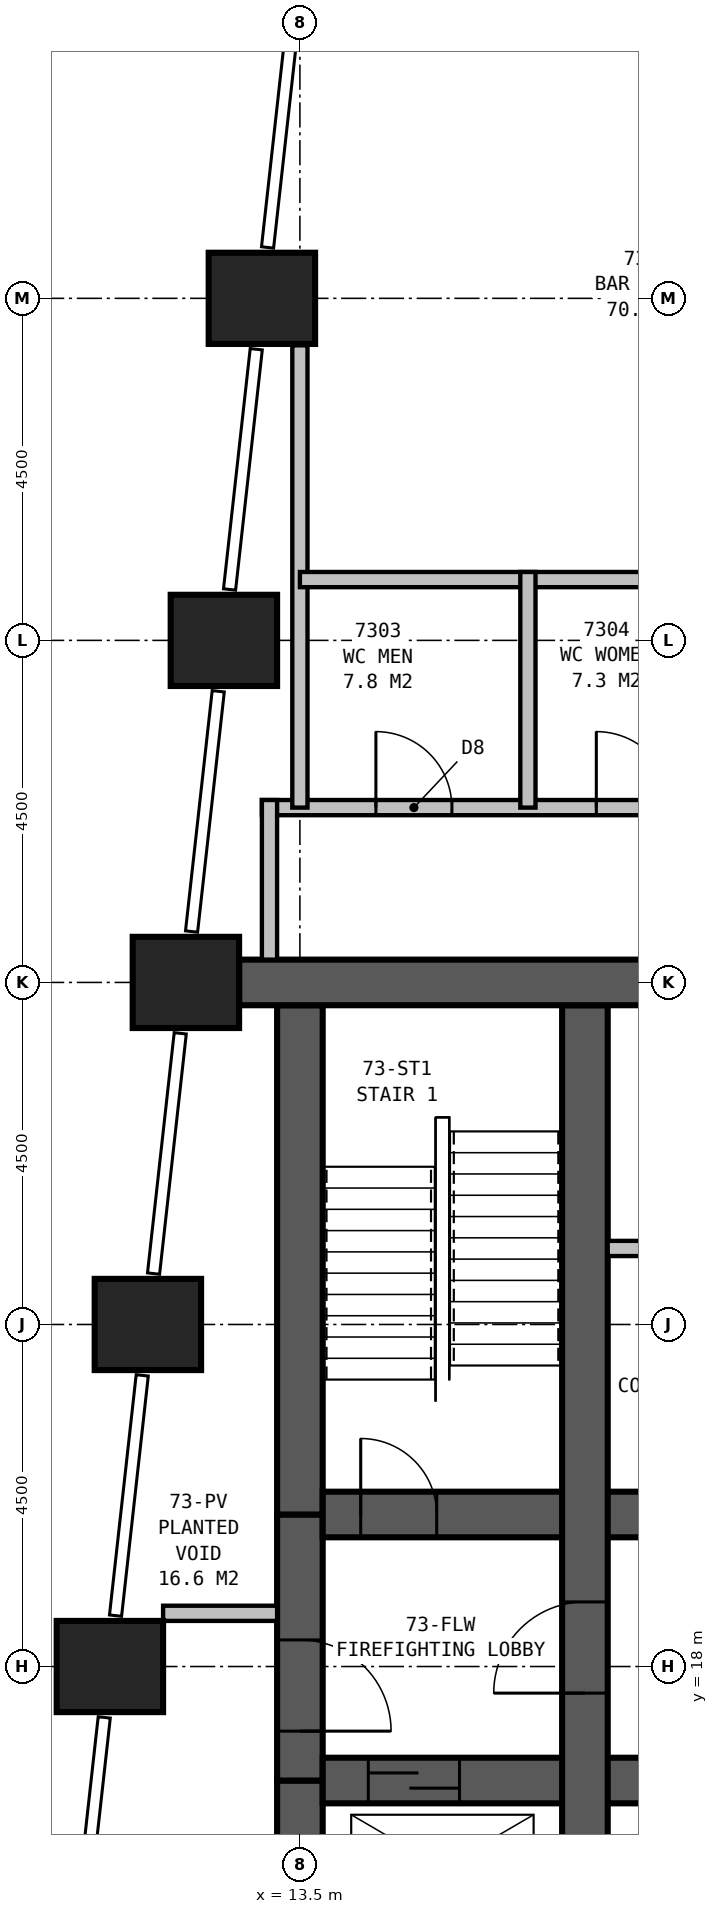
"""IFC4 building model, lengths in metres.
Left out: names, types, materials, properties, quantities, classifications, styles, units other than length and angle.
Written with IfcOpenShell. Run it as: python <this file> out.ifc"""

import sys

from ifc_helpers import new_model, si_unit, direction, frame, frame_2d, origin, origin_2d, place, context, subcontext, project, spatial, rectangle, extrude, element, fill, save


model = new_model("IFC4")
c1 = context("Model", 3, precision=1e-05, world=origin(), true_north=direction((0.0, 1.0)))
c2 = subcontext(c1, "Body", "Model", "MODEL_VIEW")
j1 = project(units=[si_unit("LENGTHUNIT", "METRE"), si_unit("PLANEANGLEUNIT", "RADIAN")], contexts=[c1])
p1 = place(None, origin())
s1 = spatial("IfcSite", under=j1, at=p1, CompositionType="ELEMENT")
p2 = place(p1, origin())
s2 = spatial("IfcBuilding", under=s1, at=p2, CompositionType="ELEMENT")
p3 = place(p2, frame((0.0, 0.0, 285.8)))
s3 = spatial("IfcBuildingStorey", under=s2, at=p3, CompositionType="ELEMENT", Elevation=285.8)
for number, where, z_axis, x_axis in (
    (1, (13.0, 36.0, 0.0), (0.0, 0.0, 1.0), (1.0, 0.0, 0.0)),
    (2, (12.5, 31.5, 0.0), (0.0, 0.0, 1.0), (1.0, 0.0, 0.0)),
    (3, (12.0, 27.0, 0.0), (0.0, 0.0, 1.0), (1.0, 0.0, 0.0)),
    (4, (11.5, 22.5, 0.0), (0.0, 0.0, 1.0), (1.0, 0.0, 0.0)),
    (5, (11.0, 18.0, 0.0), (0.0, 0.0, 1.0), (1.0, 0.0, 0.0)),
):
    element("IfcColumn", number, at=place(p3, frame(where, z_axis=z_axis, x_axis=x_axis)), inside=s3, PredefinedType="COLUMN", context=c2, shape_type="SweptSolid", body=[
        extrude(rectangle(XDim=1.4, YDim=1.2, at=origin_2d()), origin(), (0.0, 0.0, 1.0), 3.9),
    ])
p4 = place(p3, frame((36.3, 27.0, 0.0), z_axis=(0.0, 0.0, 1.0), x_axis=(-1.0, 0.0, 0.0)))
e6 = element("IfcWall", 6, at=p4, inside=s3, PredefinedType="SHEAR", context=c2, shape_type="SweptSolid", body=[
    extrude(rectangle(XDim=23.6, YDim=0.6, at=frame_2d((11.8, 0.0))), origin(), (0.0, 0.0, 1.0), 3.9),
])
p5 = place(p4, frame((17.05, 0.0, 0.0)))
e7 = element("IfcOpeningElement", 7, at=p5, cuts=e6, PredefinedType="OPENING", context=c2, shape_type="SweptSolid", body=[
    extrude(rectangle(XDim=1.0, YDim=2.1, at=frame_2d((0.5, 1.05))), frame((0.0, 0.31, 0.0), z_axis=(0.0, -1.0, 0.0), x_axis=(1.0, 0.0, 0.0)), (0.0, 0.0, 1.0), 0.62),
])
p6 = place(p4, frame((12.05, 0.0, 0.0)))
e8 = element("IfcOpeningElement", 8, at=p6, cuts=e6, PredefinedType="OPENING", context=c2, shape_type="SweptSolid", body=[
    extrude(rectangle(XDim=1.0, YDim=2.1, at=frame_2d((0.5, 1.05))), frame((0.0, 0.31, 0.0), z_axis=(0.0, -1.0, 0.0), x_axis=(1.0, 0.0, 0.0)), (0.0, 0.0, 1.0), 0.62),
])
p7 = place(p4, frame((7.05, 0.0, 0.0)))
e9 = element("IfcOpeningElement", 9, at=p7, cuts=e6, PredefinedType="OPENING", context=c2, shape_type="SweptSolid", body=[
    extrude(rectangle(XDim=1.0, YDim=2.1, at=frame_2d((0.5, 1.05))), frame((0.0, 0.31, 0.0), z_axis=(0.0, -1.0, 0.0), x_axis=(1.0, 0.0, 0.0)), (0.0, 0.0, 1.0), 0.62),
])
p8 = place(p3, frame((17.25, 13.8, 0.0), z_axis=(0.0, 0.0, 1.0), x_axis=(0.0, 1.0, 0.0)))
e10 = element("IfcWall", 10, at=p8, inside=s3, PredefinedType="SHEAR", context=c2, shape_type="SweptSolid", body=[
    extrude(rectangle(XDim=12.9, YDim=0.6, at=frame_2d((6.45, 0.0))), origin(), (0.0, 0.0, 1.0), 3.9),
])
p9 = place(p8, frame((3.85, 0.0, 0.0)))
e11 = element("IfcOpeningElement", 11, at=p9, cuts=e10, PredefinedType="OPENING", context=c2, shape_type="SweptSolid", body=[
    extrude(rectangle(XDim=1.2, YDim=2.1, at=frame_2d((0.6, 1.05))), frame((0.0, 0.31, 0.0), z_axis=(0.0, -1.0, 0.0), x_axis=(1.0, 0.0, 0.0)), (0.0, 0.0, 1.0), 0.62),
])
p10 = place(p3, frame((13.8, 16.5, 0.0), z_axis=(0.0, 0.0, 1.0), x_axis=(1.0, 0.0, 0.0)))
e12 = element("IfcWall", 12, at=p10, inside=s3, PredefinedType="SHEAR", context=c2, shape_type="SweptSolid", body=[
    extrude(rectangle(XDim=21.9, YDim=0.6, at=frame_2d((10.95, 0.0))), origin(), (0.0, 0.0, 1.0), 3.9),
])
p11 = place(p10, frame((5.75, 0.0, 0.0), z_axis=(0.0, 0.0, 1.0), x_axis=(-1.0, 0.0, 0.0)))
e13 = element("IfcOpeningElement", 13, at=p11, cuts=e12, PredefinedType="OPENING", context=c2, shape_type="SweptSolid", body=[
    extrude(rectangle(XDim=1.0, YDim=2.1, at=frame_2d((0.5, 1.05))), frame((0.0, 0.31, 0.0), z_axis=(0.0, -1.0, 0.0), x_axis=(1.0, 0.0, 0.0)), (0.0, 0.0, 1.0), 0.62),
])
p12 = place(p10, frame((10.2, 0.0, 0.0), z_axis=(0.0, 0.0, 1.0), x_axis=(-1.0, 0.0, 0.0)))
e14 = element("IfcOpeningElement", 14, at=p12, cuts=e12, PredefinedType="OPENING", context=c2, shape_type="SweptSolid", body=[
    extrude(rectangle(XDim=1.0, YDim=2.1, at=frame_2d((0.5, 1.05))), frame((0.0, 0.31, 0.0), z_axis=(0.0, -1.0, 0.0), x_axis=(1.0, 0.0, 0.0)), (0.0, 0.0, 1.0), 0.62),
])
p13 = place(p10, frame((12.7, 0.0, 0.0), z_axis=(0.0, 0.0, 1.0), x_axis=(-1.0, 0.0, 0.0)))
e15 = element("IfcOpeningElement", 15, at=p13, cuts=e12, PredefinedType="OPENING", context=c2, shape_type="SweptSolid", body=[
    extrude(rectangle(XDim=1.0, YDim=2.1, at=frame_2d((0.5, 1.05))), frame((0.0, 0.31, 0.0), z_axis=(0.0, -1.0, 0.0), x_axis=(1.0, 0.0, 0.0)), (0.0, 0.0, 1.0), 0.62),
])
p14 = place(p10, frame((17.15, 0.0, 0.0), z_axis=(0.0, 0.0, 1.0), x_axis=(-1.0, 0.0, 0.0)))
e16 = element("IfcOpeningElement", 16, at=p14, cuts=e12, PredefinedType="OPENING", context=c2, shape_type="SweptSolid", body=[
    extrude(rectangle(XDim=1.0, YDim=2.1, at=frame_2d((0.5, 1.05))), frame((0.0, 0.31, 0.0), z_axis=(0.0, -1.0, 0.0), x_axis=(1.0, 0.0, 0.0)), (0.0, 0.0, 1.0), 0.62),
])
p15 = place(p10, frame((0.6, 0.0, 0.0)))
e17 = element("IfcOpeningElement", 17, at=p15, cuts=e12, PredefinedType="OPENING", context=c2, shape_type="SweptSolid", body=[
    extrude(rectangle(XDim=1.2, YDim=2.1, at=frame_2d((0.6, 1.05))), frame((0.0, 0.31, 0.0), z_axis=(0.0, -1.0, 0.0), x_axis=(1.0, 0.0, 0.0)), (0.0, 0.0, 1.0), 0.62),
])
p16 = place(p10, frame((19.6, 0.0, 0.0)))
e18 = element("IfcOpeningElement", 18, at=p16, cuts=e12, PredefinedType="OPENING", context=c2, shape_type="SweptSolid", body=[
    extrude(rectangle(XDim=1.2, YDim=2.1, at=frame_2d((0.6, 1.05))), frame((0.0, 0.31, 0.0), z_axis=(0.0, -1.0, 0.0), x_axis=(1.0, 0.0, 0.0)), (0.0, 0.0, 1.0), 0.62),
])
p17 = place(p3, frame((13.8, 20.0, 0.0), z_axis=(0.0, 0.0, 1.0), x_axis=(1.0, 0.0, 0.0)))
e19 = element("IfcWall", 19, at=p17, inside=s3, PredefinedType="SHEAR", context=c2, shape_type="SweptSolid", body=[
    extrude(rectangle(XDim=21.9, YDim=0.6, at=frame_2d((10.95, 0.0))), origin(), (0.0, 0.0, 1.0), 3.9),
])
p18 = place(p17, frame((0.5, 0.0, 0.0)))
e20 = element("IfcOpeningElement", 20, at=p18, cuts=e19, PredefinedType="OPENING", context=c2, shape_type="SweptSolid", body=[
    extrude(rectangle(XDim=1.0, YDim=2.1, at=frame_2d((0.5, 1.05))), frame((0.0, 0.31, 0.0), z_axis=(0.0, -1.0, 0.0), x_axis=(1.0, 0.0, 0.0)), (0.0, 0.0, 1.0), 0.62),
])
p19 = place(p17, frame((20.5, 0.0, 0.0)))
e21 = element("IfcOpeningElement", 21, at=p19, cuts=e19, PredefinedType="OPENING", context=c2, shape_type="SweptSolid", body=[
    extrude(rectangle(XDim=1.0, YDim=2.1, at=frame_2d((0.5, 1.05))), frame((0.0, 0.31, 0.0), z_axis=(0.0, -1.0, 0.0), x_axis=(1.0, 0.0, 0.0)), (0.0, 0.0, 1.0), 0.62),
])
p20 = place(p17, frame((9.15, 0.0, 0.0)))
e22 = element("IfcOpeningElement", 22, at=p20, cuts=e19, PredefinedType="OPENING", context=c2, shape_type="SweptSolid", body=[
    extrude(rectangle(XDim=1.1, YDim=2.1, at=frame_2d((0.55, 1.05))), frame((0.0, 0.31, 0.0), z_axis=(0.0, -1.0, 0.0), x_axis=(1.0, 0.0, 0.0)), (0.0, 0.0, 1.0), 0.62),
])
p21 = place(p17, frame((11.65, 0.0, 0.0)))
e23 = element("IfcOpeningElement", 23, at=p21, cuts=e19, PredefinedType="OPENING", context=c2, shape_type="SweptSolid", body=[
    extrude(rectangle(XDim=1.1, YDim=2.1, at=frame_2d((0.55, 1.05))), frame((0.0, 0.31, 0.0), z_axis=(0.0, -1.0, 0.0), x_axis=(1.0, 0.0, 0.0)), (0.0, 0.0, 1.0), 0.62),
])
p22 = place(p17, frame((14.15, 0.0, 0.0)))
e24 = element("IfcOpeningElement", 24, at=p22, cuts=e19, PredefinedType="OPENING", context=c2, shape_type="SweptSolid", body=[
    extrude(rectangle(XDim=1.1, YDim=2.1, at=frame_2d((0.55, 1.05))), frame((0.0, 0.31, 0.0), z_axis=(0.0, -1.0, 0.0), x_axis=(1.0, 0.0, 0.0)), (0.0, 0.0, 1.0), 0.62),
])
p23 = place(p17, frame((16.65, 0.0, 0.0)))
e25 = element("IfcOpeningElement", 25, at=p23, cuts=e19, PredefinedType="OPENING", context=c2, shape_type="SweptSolid", body=[
    extrude(rectangle(XDim=1.1, YDim=2.1, at=frame_2d((0.55, 1.05))), frame((0.0, 0.31, 0.0), z_axis=(0.0, -1.0, 0.0), x_axis=(1.0, 0.0, 0.0)), (0.0, 0.0, 1.0), 0.62),
])
p24 = place(p17, frame((5.75, 0.0, 0.0), z_axis=(0.0, 0.0, 1.0), x_axis=(-1.0, 0.0, 0.0)))
e26 = element("IfcOpeningElement", 26, at=p24, cuts=e19, PredefinedType="OPENING", context=c2, shape_type="SweptSolid", body=[
    extrude(rectangle(XDim=1.0, YDim=2.1, at=frame_2d((0.5, 1.05))), frame((0.0, 0.31, 0.0), z_axis=(0.0, -1.0, 0.0), x_axis=(1.0, 0.0, 0.0)), (0.0, 0.0, 1.0), 0.62),
])
p25 = place(p17, frame((6.7, 0.0, 0.0)))
e27 = element("IfcOpeningElement", 27, at=p25, cuts=e19, PredefinedType="OPENING", context=c2, shape_type="SweptSolid", body=[
    extrude(rectangle(XDim=1.0, YDim=2.1, at=frame_2d((0.5, 1.05))), frame((0.0, 0.31, 0.0), z_axis=(0.0, -1.0, 0.0), x_axis=(1.0, 0.0, 0.0)), (0.0, 0.0, 1.0), 0.62),
])
p26 = place(p3, frame((13.5, 26.7, 0.0), z_axis=(0.0, 0.0, 1.0), x_axis=(0.0, -1.0, 0.0)))
e28 = element("IfcWall", 28, at=p26, inside=s3, PredefinedType="SHEAR", context=c2, shape_type="SweptSolid", body=[
    extrude(rectangle(XDim=6.7, YDim=0.6, at=frame_2d((3.35, 0.0))), origin(), (0.0, 0.0, 1.0), 3.9),
])
p27 = place(p3, frame((13.5, 20.0, 0.0), z_axis=(0.0, 0.0, 1.0), x_axis=(0.0, -1.0, 0.0)))
e29 = element("IfcWall", 29, at=p27, inside=s3, PredefinedType="SHEAR", context=c2, shape_type="SweptSolid", body=[
    extrude(rectangle(XDim=3.5, YDim=0.6, at=frame_2d((1.75, 0.0))), origin(), (0.0, 0.0, 1.0), 3.9),
])
p28 = place(p27, frame((1.65, 0.0, 0.0)))
e30 = element("IfcOpeningElement", 30, at=p28, cuts=e29, PredefinedType="OPENING", context=c2, shape_type="SweptSolid", body=[
    extrude(rectangle(XDim=1.2, YDim=2.1, at=frame_2d((0.6, 1.05))), frame((0.0, 0.31, 0.0), z_axis=(0.0, -1.0, 0.0), x_axis=(1.0, 0.0, 0.0)), (0.0, 0.0, 1.0), 0.62),
])
p29 = place(p3, frame((13.5, 16.5, 0.0), z_axis=(0.0, 0.0, 1.0), x_axis=(0.0, -1.0, 0.0)))
e31 = element("IfcWall", 31, at=p29, inside=s3, PredefinedType="SHEAR", context=c2, shape_type="SweptSolid", body=[
    extrude(rectangle(XDim=2.7, YDim=0.6, at=frame_2d((1.35, 0.0))), origin(), (0.0, 0.0, 1.0), 3.9),
])
p30 = place(p3, frame((13.0, 29.3, 0.0), z_axis=(0.0, 0.0, 1.0), x_axis=(1.0, 0.0, 0.0)))
e32 = element("IfcWall", 32, at=p30, inside=s3, PredefinedType="PARTITIONING", context=c2, shape_type="SweptSolid", body=[
    extrude(rectangle(XDim=25.3, YDim=0.2, at=frame_2d((12.65, 0.0))), origin(), (0.0, 0.0, 1.0), 3.65),
])
p31 = place(p30, frame((1.5, 0.0, 0.0)))
e33 = element("IfcOpeningElement", 33, at=p31, cuts=e32, PredefinedType="OPENING", context=c2, shape_type="SweptSolid", body=[
    extrude(rectangle(XDim=1.0, YDim=2.1, at=frame_2d((0.5, 1.05))), frame((0.0, 0.11, 0.0), z_axis=(0.0, -1.0, 0.0), x_axis=(1.0, 0.0, 0.0)), (0.0, 0.0, 1.0), 0.22),
])
p32 = place(p30, frame((4.4, 0.0, 0.0)))
e34 = element("IfcOpeningElement", 34, at=p32, cuts=e32, PredefinedType="OPENING", context=c2, shape_type="SweptSolid", body=[
    extrude(rectangle(XDim=1.0, YDim=2.1, at=frame_2d((0.5, 1.05))), frame((0.0, 0.11, 0.0), z_axis=(0.0, -1.0, 0.0), x_axis=(1.0, 0.0, 0.0)), (0.0, 0.0, 1.0), 0.22),
])
p33 = place(p30, frame((7.2, 0.0, 0.0)))
e35 = element("IfcOpeningElement", 35, at=p33, cuts=e32, PredefinedType="OPENING", context=c2, shape_type="SweptSolid", body=[
    extrude(rectangle(XDim=1.0, YDim=2.1, at=frame_2d((0.5, 1.05))), frame((0.0, 0.11, 0.0), z_axis=(0.0, -1.0, 0.0), x_axis=(1.0, 0.0, 0.0)), (0.0, 0.0, 1.0), 0.22),
])
p34 = place(p30, frame((9.95, 0.0, 0.0)))
e36 = element("IfcOpeningElement", 36, at=p34, cuts=e32, PredefinedType="OPENING", context=c2, shape_type="SweptSolid", body=[
    extrude(rectangle(XDim=1.0, YDim=2.1, at=frame_2d((0.5, 1.05))), frame((0.0, 0.11, 0.0), z_axis=(0.0, -1.0, 0.0), x_axis=(1.0, 0.0, 0.0)), (0.0, 0.0, 1.0), 0.22),
])
p35 = place(p30, frame((16.25, 0.0, 0.0), z_axis=(0.0, 0.0, 1.0), x_axis=(-1.0, 0.0, 0.0)))
e37 = element("IfcOpeningElement", 37, at=p35, cuts=e32, PredefinedType="OPENING", context=c2, shape_type="SweptSolid", body=[
    extrude(rectangle(XDim=1.8, YDim=2.4, at=frame_2d((0.9, 1.2))), frame((0.0, 0.11, 0.0), z_axis=(0.0, -1.0, 0.0), x_axis=(1.0, 0.0, 0.0)), (0.0, 0.0, 1.0), 0.22),
])
p36 = place(p30, frame((24.75, 0.0, 0.0), z_axis=(0.0, 0.0, 1.0), x_axis=(-1.0, 0.0, 0.0)))
e38 = element("IfcOpeningElement", 38, at=p36, cuts=e32, PredefinedType="OPENING", context=c2, shape_type="SweptSolid", body=[
    extrude(rectangle(XDim=1.2, YDim=2.1, at=frame_2d((0.6, 1.05))), frame((0.0, 0.11, 0.0), z_axis=(0.0, -1.0, 0.0), x_axis=(1.0, 0.0, 0.0)), (0.0, 0.0, 1.0), 0.22),
])
p37 = place(p3, frame((13.5, 29.3, 0.0), z_axis=(0.0, 0.0, 1.0), x_axis=(0.0, 1.0, 0.0)))
e39 = element("IfcWall", 39, at=p37, inside=s3, PredefinedType="PARTITIONING", context=c2, shape_type="SweptSolid", body=[
    extrude(rectangle(XDim=6.082, YDim=0.2, at=frame_2d((3.041, 0.0))), origin(), (0.0, 0.0, 1.0), 2.6),
])
p38 = place(p3, frame((16.5, 29.3, 0.0), z_axis=(0.0, 0.0, 1.0), x_axis=(0.0, 1.0, 0.0)))
e40 = element("IfcWall", 40, at=p38, inside=s3, PredefinedType="PARTITIONING", context=c2, shape_type="SweptSolid", body=[
    extrude(rectangle(XDim=3.1, YDim=0.2, at=frame_2d((1.55, 0.0))), origin(), (0.0, 0.0, 1.0), 3.65),
])
p39 = place(p3, frame((13.5, 32.3, 0.0), z_axis=(0.0, 0.0, 1.0), x_axis=(1.0, 0.0, 0.0)))
e41 = element("IfcWall", 41, at=p39, inside=s3, PredefinedType="PARTITIONING", context=c2, shape_type="SweptSolid", body=[
    extrude(rectangle(XDim=8.6, YDim=0.2, at=frame_2d((4.3, 0.0))), origin(), (0.0, 0.0, 1.0), 3.65),
])
p40 = place(p3, frame((13.2, 18.7, 0.0), z_axis=(0.0, 0.0, 1.0), x_axis=(-1.0, 0.0, 0.0)))
e42 = element("IfcWall", 42, at=p40, inside=s3, PredefinedType="PARTITIONING", context=c2, shape_type="SweptSolid", body=[
    extrude(rectangle(XDim=1.5, YDim=0.2, at=frame_2d((0.75, 0.0))), origin(), (0.0, 0.0, 1.0), 3.65),
])
p41 = place(p3, frame((13.1, 27.3, 0.0), z_axis=(0.0, 0.0, 1.0), x_axis=(0.0, 1.0, 0.0)))
e43 = element("IfcWall", 43, at=p41, inside=s3, PredefinedType="PARTITIONING", context=c2, shape_type="SweptSolid", body=[
    extrude(rectangle(XDim=2.1, YDim=0.2, at=frame_2d((1.05, 0.0))), origin(), (0.0, 0.0, 1.0), 3.65),
])
p42 = place(p3, frame((17.55, 23.5, 0.0), z_axis=(0.0, 0.0, 1.0), x_axis=(1.0, 0.0, 0.0)))
e44 = element("IfcWall", 44, at=p42, inside=s3, PredefinedType="PARTITIONING", context=c2, shape_type="SweptSolid", body=[
    extrude(rectangle(XDim=14.4, YDim=0.2, at=frame_2d((7.2, 0.0))), origin(), (0.0, 0.0, 1.0), 3.65),
])
p43 = place(p42, frame((0.45, 0.0, 0.0)))
e45 = element("IfcOpeningElement", 45, at=p43, cuts=e44, PredefinedType="OPENING", context=c2, shape_type="SweptSolid", body=[
    extrude(rectangle(XDim=1.0, YDim=2.1, at=frame_2d((0.5, 1.05))), frame((0.0, 0.11, 0.0), z_axis=(0.0, -1.0, 0.0), x_axis=(1.0, 0.0, 0.0)), (0.0, 0.0, 1.0), 0.22),
])
p44 = place(p31, origin())
e46 = element("IfcDoor", 46, at=p44, inside=s3, OperationType="SINGLE_SWING_LEFT", PredefinedType="DOOR", context=c2, shape_type="SweptSolid", body=[
    extrude(rectangle(XDim=1.0, YDim=2.1, at=frame_2d((0.5, 1.05))), frame((0.0, 0.025, 0.0), z_axis=(0.0, -1.0, 0.0), x_axis=(1.0, 0.0, 0.0)), (0.0, 0.0, 1.0), 0.05),
])
fill(e33, e46)
p45 = place(p32, origin())
e47 = element("IfcDoor", 47, at=p45, inside=s3, OperationType="SINGLE_SWING_LEFT", PredefinedType="DOOR", context=c2, shape_type="SweptSolid", body=[
    extrude(rectangle(XDim=1.0, YDim=2.1, at=frame_2d((0.5, 1.05))), frame((0.0, 0.025, 0.0), z_axis=(0.0, -1.0, 0.0), x_axis=(1.0, 0.0, 0.0)), (0.0, 0.0, 1.0), 0.05),
])
fill(e34, e47)
p46 = place(p28, origin())
e48 = element("IfcDoor", 48, at=p46, inside=s3, OperationType="SINGLE_SWING_RIGHT", PredefinedType="DOOR", context=c2, shape_type="SweptSolid", body=[
    extrude(rectangle(XDim=1.2, YDim=2.1, at=frame_2d((0.6, 1.05))), frame((0.0, 0.3, 0.0), z_axis=(0.0, -1.0, 0.0), x_axis=(1.0, 0.0, 0.0)), (0.0, 0.0, 1.0), 0.6),
])
fill(e30, e48)
p47 = place(p9, origin())
e49 = element("IfcDoor", 49, at=p47, inside=s3, OperationType="SINGLE_SWING_LEFT", PredefinedType="DOOR", context=c2, shape_type="SweptSolid", body=[
    extrude(rectangle(XDim=1.2, YDim=2.1, at=frame_2d((0.6, 1.05))), frame((0.0, 0.3, 0.0), z_axis=(0.0, -1.0, 0.0), x_axis=(1.0, 0.0, 0.0)), (0.0, 0.0, 1.0), 0.6),
])
fill(e11, e49)
p48 = place(p18, origin())
e50 = element("IfcDoor", 50, at=p48, inside=s3, OperationType="SINGLE_SWING_LEFT", PredefinedType="DOOR", context=c2, shape_type="SweptSolid", body=[
    extrude(rectangle(XDim=1.0, YDim=2.1, at=frame_2d((0.5, 1.05))), frame((0.0, 0.3, 0.0), z_axis=(0.0, -1.0, 0.0), x_axis=(1.0, 0.0, 0.0)), (0.0, 0.0, 1.0), 0.6),
])
fill(e20, e50)
p49 = place(p15, origin())
e51 = element("IfcDoor", 51, at=p49, inside=s3, OperationType="SLIDING_TO_LEFT", PredefinedType="DOOR", context=c2, shape_type="SweptSolid", body=[
    extrude(rectangle(XDim=1.2, YDim=2.1, at=frame_2d((0.6, 1.05))), frame((0.0, 0.3, 0.0), z_axis=(0.0, -1.0, 0.0), x_axis=(1.0, 0.0, 0.0)), (0.0, 0.0, 1.0), 0.6),
])
fill(e17, e51)
save(model, sys.argv[1])
